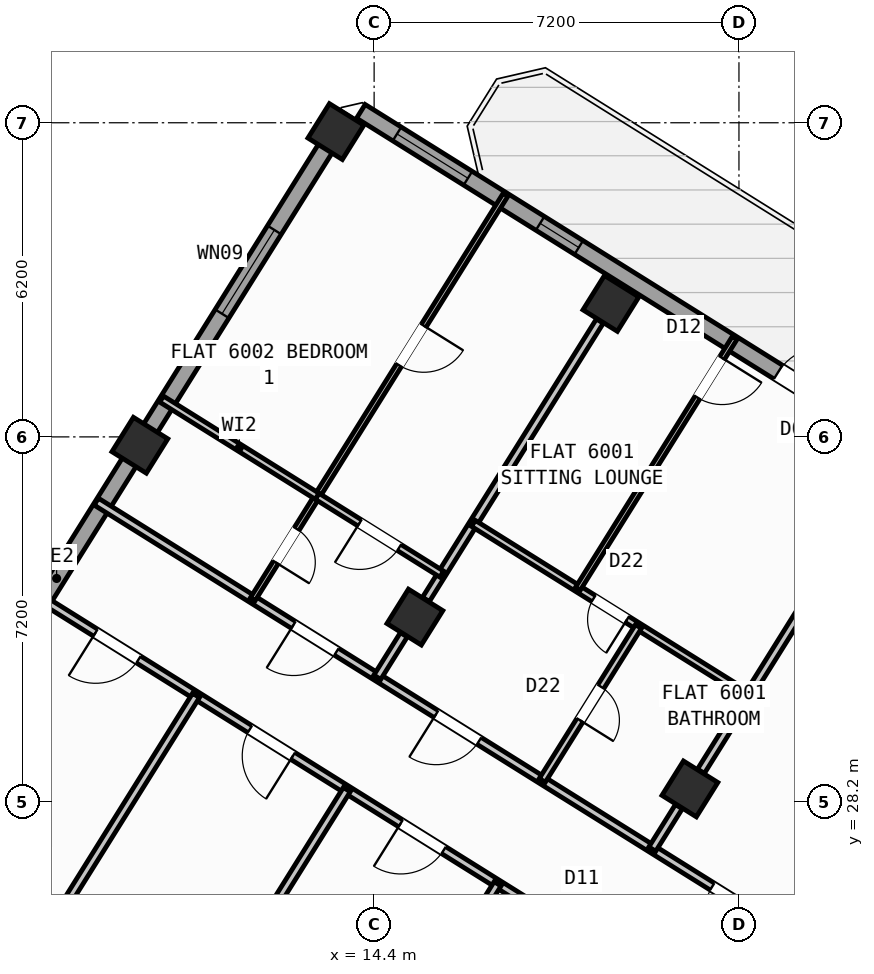
"""IFC4 building model, lengths in metres.
Left out: names, types, materials, properties, quantities, classifications, styles, units other than length and angle.
Written with IfcOpenShell. Run it as: python <this file> out.ifc"""

import sys

from ifc_helpers import new_model, si_unit, direction, frame, frame_2d, origin, origin_2d, place, context, subcontext, project, spatial, rectangle, hollow_rectangle, extrude, source, transform, mapped, element, fill, save


model = new_model("IFC4")
c1 = context("Model", 3, precision=1e-05, world=origin(), true_north=direction((0.0, 1.0)))
c2 = subcontext(c1, "Body", "Model", "MODEL_VIEW")
j1 = project(units=[si_unit("LENGTHUNIT", "METRE"), si_unit("PLANEANGLEUNIT", "RADIAN")], contexts=[c1])
p1 = place(None, origin())
s1 = spatial("IfcSite", under=j1, at=p1, CompositionType="ELEMENT")
p2 = place(p1, origin())
s2 = spatial("IfcBuilding", under=s1, at=p2, CompositionType="ELEMENT")
p3 = place(p2, frame((0.0, 0.0, 238.5)))
s3 = spatial("IfcBuildingStorey", under=s2, at=p3, CompositionType="ELEMENT", Elevation=238.5)
m1 = source(origin(), c2, "Body", "SweptSolid", [
    extrude(hollow_rectangle(XDim=0.8, YDim=0.8, WallThickness=0.032, at=origin_2d()), origin(), (0.0, 0.0, 1.0), 3.6),
])
for number, where, z_axis, x_axis in (
    (1, (20.632, 28.452, 0.0), (0.0, 0.0, 1.0), (-0.848, 0.53, 0.0)),
    (2, (19.073, 38.034, 0.0), (0.0, 0.0, 1.0), (-0.848, 0.53, 0.0)),
    (3, (15.205, 31.844, 0.0), (0.0, 0.0, 1.0), (-0.848, 0.53, 0.0)),
    (4, (13.646, 41.426, 0.0), (0.0, 0.0, 1.0), (-0.848, 0.53, 0.0)),
    (5, (9.777, 35.235, 0.0), (0.0, 0.0, 1.0), (-0.848, 0.53, 0.0)),
):
    element("IfcColumn", number, at=place(p3, frame(where, z_axis=z_axis, x_axis=x_axis)), inside=s3, PredefinedType="COLUMN", context=c2, shape_type="MappedRepresentation", body=[
        mapped(m1, transform((0.0, 0.0, 0.0), scale=1.0)),
    ])
p4 = place(p3, frame((2.415, 23.452, 0.0), z_axis=(0.0, 0.0, 1.0), x_axis=(0.52991049553, 0.848053575387, 0.0)))
e6 = element("IfcWall", 6, at=p4, inside=s3, PredefinedType="STANDARD", context=c2, shape_type="SweptSolid", body=[
    extrude(rectangle(XDim=21.587, YDim=0.32, at=frame_2d((10.794, 0.0))), origin(), (0.0, 0.0, 1.0), 2.875),
])
p5 = place(p4, frame((2.581, 0.0, 0.9)))
e7 = element("IfcOpeningElement", 7, at=p5, cuts=e6, PredefinedType="OPENING", context=c2, shape_type="SweptSolid", body=[
    extrude(rectangle(XDim=1.65, YDim=1.45, at=frame_2d((0.825, 0.725))), frame((0.0, 0.17, 0.0), z_axis=(0.0, -1.0, 0.0), x_axis=(1.0, 0.0, 0.0)), (0.0, 0.0, 1.0), 0.34),
])
p6 = place(p4, frame((7.879, 0.0, 0.9)))
e8 = element("IfcOpeningElement", 8, at=p6, cuts=e6, PredefinedType="OPENING", context=c2, shape_type="SweptSolid", body=[
    extrude(rectangle(XDim=1.35, YDim=1.45, at=frame_2d((0.675, 0.725))), frame((0.0, 0.17, 0.0), z_axis=(0.0, -1.0, 0.0), x_axis=(1.0, 0.0, 0.0)), (0.0, 0.0, 1.0), 0.34),
])
p7 = place(p4, frame((16.954, 0.0, 0.95)))
e9 = element("IfcOpeningElement", 9, at=p7, cuts=e6, PredefinedType="OPENING", context=c2, shape_type="SweptSolid", body=[
    extrude(rectangle(XDim=1.95, YDim=1.35, at=frame_2d((0.975, 0.675))), frame((0.0, 0.17, 0.0), z_axis=(0.0, -1.0, 0.0), x_axis=(1.0, 0.0, 0.0)), (0.0, 0.0, 1.0), 0.34),
])
p8 = place(p3, frame((14.138, 41.825, 0.0), z_axis=(0.0, 0.0, 1.0), x_axis=(0.848046498049, -0.529921821731, 0.0)))
e10 = element("IfcWall", 10, at=p8, inside=s3, PredefinedType="STANDARD", context=c2, shape_type="SweptSolid", body=[
    extrude(rectangle(XDim=31.588, YDim=0.32, at=frame_2d((15.794, 0.0))), origin(), (0.0, 0.0, 1.0), 3.35),
])
p9 = place(p8, frame((9.712, 0.0, 0.0)))
e11 = element("IfcOpeningElement", 11, at=p9, cuts=e10, PredefinedType="OPENING", context=c2, shape_type="SweptSolid", body=[
    extrude(rectangle(XDim=1.05, YDim=2.15, at=frame_2d((0.525, 1.075))), frame((0.0, 0.17, 0.0), z_axis=(0.0, -1.0, 0.0), x_axis=(1.0, 0.0, 0.0)), (0.0, 0.0, 1.0), 0.34),
])
p10 = place(p8, frame((0.841, 0.0, 0.9)))
e12 = element("IfcOpeningElement", 12, at=p10, cuts=e10, PredefinedType="OPENING", context=c2, shape_type="SweptSolid", body=[
    extrude(rectangle(XDim=1.65, YDim=1.45, at=frame_2d((0.825, 0.725))), frame((0.0, 0.17, 0.0), z_axis=(0.0, -1.0, 0.0), x_axis=(1.0, 0.0, 0.0)), (0.0, 0.0, 1.0), 0.34),
])
p11 = place(p8, frame((4.171, 0.0, 1.0)))
e13 = element("IfcOpeningElement", 13, at=p11, cuts=e10, PredefinedType="OPENING", context=c2, shape_type="SweptSolid", body=[
    extrude(rectangle(XDim=0.9, YDim=1.25, at=frame_2d((0.45, 0.625))), frame((0.0, 0.17, 0.0), z_axis=(0.0, -1.0, 0.0), x_axis=(1.0, 0.0, 0.0)), (0.0, 0.0, 1.0), 0.34),
])
p12 = place(p8, frame((13.624, 0.0, 0.95)))
e14 = element("IfcOpeningElement", 14, at=p12, cuts=e10, PredefinedType="OPENING", context=c2, shape_type="SweptSolid", body=[
    extrude(rectangle(XDim=1.95, YDim=1.35, at=frame_2d((0.975, 0.675))), frame((0.0, 0.17, 0.0), z_axis=(0.0, -1.0, 0.0), x_axis=(1.0, 0.0, 0.0)), (0.0, 0.0, 1.0), 0.34),
])
p13 = place(p8, frame((17.129, 0.0, 1.0)))
e15 = element("IfcOpeningElement", 15, at=p13, cuts=e10, PredefinedType="OPENING", context=c2, shape_type="SweptSolid", body=[
    extrude(rectangle(XDim=0.9, YDim=1.25, at=frame_2d((0.45, 0.625))), frame((0.0, 0.17, 0.0), z_axis=(0.0, -1.0, 0.0), x_axis=(1.0, 0.0, 0.0)), (0.0, 0.0, 1.0), 0.34),
])
p14 = place(p8, frame((21.744, 0.0, 0.9)))
e16 = element("IfcOpeningElement", 16, at=p14, cuts=e10, PredefinedType="OPENING", context=c2, shape_type="SweptSolid", body=[
    extrude(rectangle(XDim=1.65, YDim=1.45, at=frame_2d((0.825, 0.725))), frame((0.0, 0.17, 0.0), z_axis=(0.0, -1.0, 0.0), x_axis=(1.0, 0.0, 0.0)), (0.0, 0.0, 1.0), 0.34),
])
p15 = place(p8, frame((27.394, 0.0, 0.9)))
e17 = element("IfcOpeningElement", 17, at=p15, cuts=e10, PredefinedType="OPENING", context=c2, shape_type="SweptSolid", body=[
    extrude(rectangle(XDim=1.65, YDim=1.45, at=frame_2d((0.825, 0.725))), frame((0.0, 0.17, 0.0), z_axis=(0.0, -1.0, 0.0), x_axis=(1.0, 0.0, 0.0)), (0.0, 0.0, 1.0), 0.34),
])
p16 = place(p3, frame((23.104, 25.256, 0.0), z_axis=(0.0, 0.0, 1.0), x_axis=(-0.848041752158, 0.529929416617, 0.0)))
e18 = element("IfcWall", 18, at=p16, inside=s3, PredefinedType="PARTITIONING", context=c2, shape_type="SweptSolid", body=[
    extrude(rectangle(XDim=16.73, YDim=0.16, at=frame_2d((8.365, 0.0))), origin(), (0.0, 0.0, 1.0), 3.34),
])
p17 = place(p16, frame((1.395, 0.0, 0.0)))
e19 = element("IfcOpeningElement", 19, at=p17, cuts=e18, PredefinedType="OPENING", context=c2, shape_type="SweptSolid", body=[
    extrude(rectangle(XDim=1.0, YDim=2.1, at=frame_2d((0.5, 1.05))), frame((0.0, 0.09, 0.0), z_axis=(0.0, -1.0, 0.0), x_axis=(1.0, 0.0, 0.0)), (0.0, 0.0, 1.0), 0.18),
])
p18 = place(p16, frame((7.82, 0.0, 0.0)))
e20 = element("IfcOpeningElement", 20, at=p18, cuts=e18, PredefinedType="OPENING", context=c2, shape_type="SweptSolid", body=[
    extrude(rectangle(XDim=1.0, YDim=2.1, at=frame_2d((0.5, 1.05))), frame((0.0, 0.09, 0.0), z_axis=(0.0, -1.0, 0.0), x_axis=(1.0, 0.0, 0.0)), (0.0, 0.0, 1.0), 0.18),
])
p19 = place(p16, frame((11.14, 0.0, 0.0)))
e21 = element("IfcOpeningElement", 21, at=p19, cuts=e18, PredefinedType="OPENING", context=c2, shape_type="SweptSolid", body=[
    extrude(rectangle(XDim=1.0, YDim=2.1, at=frame_2d((0.5, 1.05))), frame((0.0, 0.09, 0.0), z_axis=(0.0, -1.0, 0.0), x_axis=(1.0, 0.0, 0.0)), (0.0, 0.0, 1.0), 0.18),
])
p20 = place(p3, frame((21.938, 23.391, 0.0), z_axis=(0.0, 0.0, 1.0), x_axis=(-0.848045850158, 0.529922858565, 0.0)))
e22 = element("IfcWall", 22, at=p20, inside=s3, PredefinedType="PARTITIONING", context=c2, shape_type="SweptSolid", body=[
    extrude(rectangle(XDim=16.73, YDim=0.16, at=frame_2d((8.365, 0.0))), origin(), (0.0, 0.0, 1.0), 3.34),
])
p21 = place(p20, frame((0.92, 0.0, 0.0)))
e23 = element("IfcOpeningElement", 23, at=p21, cuts=e22, PredefinedType="OPENING", context=c2, shape_type="SweptSolid", body=[
    extrude(rectangle(XDim=1.0, YDim=2.1, at=frame_2d((0.5, 1.05))), frame((0.0, 0.09, 0.0), z_axis=(0.0, -1.0, 0.0), x_axis=(1.0, 0.0, 0.0)), (0.0, 0.0, 1.0), 0.18),
])
p22 = place(p20, frame((3.928, 0.0, 0.0)))
e24 = element("IfcOpeningElement", 24, at=p22, cuts=e22, PredefinedType="OPENING", context=c2, shape_type="SweptSolid", body=[
    extrude(rectangle(XDim=1.0, YDim=2.1, at=frame_2d((0.5, 1.05))), frame((0.0, 0.09, 0.0), z_axis=(0.0, -1.0, 0.0), x_axis=(1.0, 0.0, 0.0)), (0.0, 0.0, 1.0), 0.18),
])
p23 = place(p20, frame((7.271, 0.0, 0.0)))
e25 = element("IfcOpeningElement", 25, at=p23, cuts=e22, PredefinedType="OPENING", context=c2, shape_type="SweptSolid", body=[
    extrude(rectangle(XDim=1.0, YDim=2.1, at=frame_2d((0.5, 1.05))), frame((0.0, 0.09, 0.0), z_axis=(0.0, -1.0, 0.0), x_axis=(1.0, 0.0, 0.0)), (0.0, 0.0, 1.0), 0.18),
])
p24 = place(p20, frame((10.78, 0.0, 0.0)))
e26 = element("IfcOpeningElement", 26, at=p24, cuts=e22, PredefinedType="OPENING", context=c2, shape_type="SweptSolid", body=[
    extrude(rectangle(XDim=1.0, YDim=2.1, at=frame_2d((0.5, 1.05))), frame((0.0, 0.09, 0.0), z_axis=(0.0, -1.0, 0.0), x_axis=(1.0, 0.0, 0.0)), (0.0, 0.0, 1.0), 0.18),
])
p25 = place(p20, frame((14.372, 0.0, 0.0)))
e27 = element("IfcOpeningElement", 27, at=p25, cuts=e22, PredefinedType="OPENING", context=c2, shape_type="SweptSolid", body=[
    extrude(rectangle(XDim=1.0, YDim=2.1, at=frame_2d((0.5, 1.05))), frame((0.0, 0.09, 0.0), z_axis=(0.0, -1.0, 0.0), x_axis=(1.0, 0.0, 0.0)), (0.0, 0.0, 1.0), 0.18),
])
p26 = place(p3, frame((16.837, 26.579, 0.0), z_axis=(0.0, 0.0, 1.0), x_axis=(-0.529941690036, -0.848034082547, 0.0)))
e28 = element("IfcWall", 28, at=p26, inside=s3, PredefinedType="PARTITIONING", context=c2, shape_type="SweptSolid", body=[
    extrude(rectangle(XDim=10.35, YDim=0.16, at=frame_2d((5.175, 0.0))), origin(), (0.0, 0.0, 1.0), 3.025),
])
p27 = place(p3, frame((13.861, 28.438, 0.0), z_axis=(0.0, 0.0, 1.0), x_axis=(-0.529931089283, -0.848040706931, 0.0)))
e29 = element("IfcWall", 29, at=p27, inside=s3, PredefinedType="PARTITIONING", context=c2, shape_type="SweptSolid", body=[
    extrude(rectangle(XDim=10.35, YDim=0.16, at=frame_2d((5.175, 0.0))), origin(), (0.0, 0.0, 1.0), 3.34),
])
p28 = place(p3, frame((10.885, 30.298, 0.0), z_axis=(0.0, 0.0, 1.0), x_axis=(-0.529924725692, -0.848044683434, 0.0)))
e30 = element("IfcWall", 30, at=p28, inside=s3, PredefinedType="PARTITIONING", context=c2, shape_type="SweptSolid", body=[
    extrude(rectangle(XDim=10.35, YDim=0.16, at=frame_2d((5.175, 0.0))), origin(), (0.0, 0.0, 1.0), 3.34),
])
p29 = place(p3, frame((24.282, 34.293, 0.0), z_axis=(0.0, 0.0, 1.0), x_axis=(-0.529934553702, -0.848038542045, 0.0)))
e31 = element("IfcWall", 31, at=p29, inside=s3, PredefinedType="PARTITIONING", context=c2, shape_type="SweptSolid", body=[
    extrude(rectangle(XDim=6.476, YDim=0.16, at=frame_2d((3.238, 0.0))), origin(), (0.0, 0.0, 1.0), 2.875),
])
p30 = place(p3, frame((20.414, 28.103, 0.0), z_axis=(0.0, 0.0, 1.0), x_axis=(-0.529998940003, -0.847998304005, 0.0)))
e32 = element("IfcWall", 32, at=p30, inside=s3, PredefinedType="PARTITIONING", context=c2, shape_type="SweptSolid", body=[
    extrude(rectangle(XDim=0.988, YDim=0.16, at=frame_2d((0.494, 0.0))), origin(), (0.0, 0.0, 1.0), 2.875),
])
p31 = place(p3, frame((18.854, 37.685, 0.0), z_axis=(0.0, 0.0, 1.0), x_axis=(-0.529907440938, -0.848055484057, 0.0)))
e33 = element("IfcWall", 33, at=p31, inside=s3, PredefinedType="PARTITIONING", context=c2, shape_type="SweptSolid", body=[
    extrude(rectangle(XDim=6.476, YDim=0.16, at=frame_2d((3.238, 0.0))), origin(), (0.0, 0.0, 1.0), 2.875),
])
p32 = place(p3, frame((14.986, 31.494, 0.0), z_axis=(0.0, 0.0, 1.0), x_axis=(-0.529821225456, -0.848109349704, 0.0)))
e34 = element("IfcWall", 34, at=p32, inside=s3, PredefinedType="PARTITIONING", context=c2, shape_type="SweptSolid", body=[
    extrude(rectangle(XDim=0.988, YDim=0.16, at=frame_2d((0.494, 0.0))), origin(), (0.0, 0.0, 1.0), 2.875),
])
p33 = place(p3, frame((21.787, 30.301, 0.0), z_axis=(0.0, 0.0, 1.0), x_axis=(-0.848049732085, 0.529916646191, 0.0)))
e35 = element("IfcWall", 35, at=p33, inside=s3, PredefinedType="PLUMBINGWALL", context=c2, shape_type="SweptSolid", body=[
    extrude(rectangle(XDim=6.4, YDim=0.14, at=frame_2d((3.2, 0.0))), origin(), (0.0, 0.0, 1.0), 3.34),
])
p34 = place(p33, frame((2.824, 0.0, 0.0)))
e36 = element("IfcOpeningElement", 36, at=p34, cuts=e35, PredefinedType="OPENING", context=c2, shape_type="SweptSolid", body=[
    extrude(rectangle(XDim=0.78, YDim=2.05, at=frame_2d((0.39, 1.025))), frame((0.0, 0.08, 0.0), z_axis=(0.0, -1.0, 0.0), x_axis=(1.0, 0.0, 0.0)), (0.0, 0.0, 1.0), 0.16),
])
p35 = place(p3, frame((19.616, 31.657, 0.0), z_axis=(0.0, 0.0, 1.0), x_axis=(-0.529876336437, -0.84807491891, 0.0)))
e37 = element("IfcWall", 37, at=p35, inside=s3, PredefinedType="PLUMBINGWALL", context=c2, shape_type="SweptSolid", body=[
    extrude(rectangle(XDim=3.58, YDim=0.14, at=frame_2d((1.79, 0.0))), origin(), (0.0, 0.0, 1.0), 3.34),
])
p36 = place(p35, frame((1.4, 0.0, 0.0)))
e38 = element("IfcOpeningElement", 38, at=p36, cuts=e37, PredefinedType="OPENING", context=c2, shape_type="SweptSolid", body=[
    extrude(rectangle(XDim=0.78, YDim=2.05, at=frame_2d((0.39, 1.025))), frame((0.0, 0.08, 0.0), z_axis=(0.0, -1.0, 0.0), x_axis=(1.0, 0.0, 0.0)), (0.0, 0.0, 1.0), 0.16),
])
p37 = place(p3, frame((21.517, 37.356, 0.0), z_axis=(0.0, 0.0, 1.0), x_axis=(-0.529916267533, -0.848049968695, 0.0)))
e39 = element("IfcWall", 39, at=p37, inside=s3, PredefinedType="PARTITIONING", context=c2, shape_type="SweptSolid", body=[
    extrude(rectangle(XDim=5.84, YDim=0.11, at=frame_2d((2.92, 0.0))), origin(), (0.0, 0.0, 1.0), 3.34),
])
p38 = place(p37, frame((0.47, 0.0, 0.0)))
e40 = element("IfcOpeningElement", 40, at=p38, cuts=e39, PredefinedType="OPENING", context=c2, shape_type="SweptSolid", body=[
    extrude(rectangle(XDim=0.92, YDim=2.08, at=frame_2d((0.46, 1.04))), frame((0.0, 0.065, 0.0), z_axis=(0.0, -1.0, 0.0), x_axis=(1.0, 0.0, 0.0)), (0.0, 0.0, 1.0), 0.13),
])
p39 = place(p3, frame((16.995, 40.182, 0.0), z_axis=(0.0, 0.0, 1.0), x_axis=(-0.529931378574, -0.848040526156, 0.0)))
e41 = element("IfcWall", 41, at=p39, inside=s3, PredefinedType="PARTITIONING", context=c2, shape_type="SweptSolid", body=[
    extrude(rectangle(XDim=9.42, YDim=0.11, at=frame_2d((4.71, 0.0))), origin(), (0.0, 0.0, 1.0), 3.34),
])
p40 = place(p39, frame((7.78, 0.0, 0.0)))
e42 = element("IfcOpeningElement", 42, at=p40, cuts=e41, PredefinedType="OPENING", context=c2, shape_type="SweptSolid", body=[
    extrude(rectangle(XDim=0.78, YDim=2.05, at=frame_2d((0.39, 1.025))), frame((0.0, 0.065, 0.0), z_axis=(0.0, -1.0, 0.0), x_axis=(1.0, 0.0, 0.0)), (0.0, 0.0, 1.0), 0.13),
])
p41 = place(p39, frame((3.05, 0.0, 0.0)))
e43 = element("IfcOpeningElement", 43, at=p41, cuts=e41, PredefinedType="OPENING", context=c2, shape_type="SweptSolid", body=[
    extrude(rectangle(XDim=0.92, YDim=2.08, at=frame_2d((0.46, 1.04))), frame((0.0, 0.065, 0.0), z_axis=(0.0, -1.0, 0.0), x_axis=(1.0, 0.0, 0.0)), (0.0, 0.0, 1.0), 0.13),
])
p42 = place(p3, frame((15.734, 32.692, 0.0), z_axis=(0.0, 0.0, 1.0), x_axis=(-0.848059786386, 0.529900555496, 0.0)))
e44 = element("IfcWall", 44, at=p42, inside=s3, PredefinedType="PLUMBINGWALL", context=c2, shape_type="SweptSolid", body=[
    extrude(rectangle(XDim=2.9, YDim=0.14, at=frame_2d((1.45, 0.0))), origin(), (0.0, 0.0, 1.0), 3.34),
])
p43 = place(p42, frame((0.99, 0.0, 0.0)))
e45 = element("IfcOpeningElement", 45, at=p43, cuts=e44, PredefinedType="OPENING", context=c2, shape_type="SweptSolid", body=[
    extrude(rectangle(XDim=0.92, YDim=2.08, at=frame_2d((0.46, 1.04))), frame((0.0, 0.08, 0.0), z_axis=(0.0, -1.0, 0.0), x_axis=(1.0, 0.0, 0.0)), (0.0, 0.0, 1.0), 0.16),
])
p44 = place(p3, frame((13.275, 34.228, 0.0), z_axis=(0.0, 0.0, 1.0), x_axis=(-0.848039976902, 0.529932257535, 0.0)))
e46 = element("IfcWall", 46, at=p44, inside=s3, PredefinedType="PLUMBINGWALL", context=c2, shape_type="SweptSolid", body=[
    extrude(rectangle(XDim=3.62, YDim=0.14, at=frame_2d((1.81, 0.0))), origin(), (0.0, 0.0, 1.0), 3.34),
])
m2 = source(origin(), c2, "Body", "SweptSolid", [
    extrude(rectangle(XDim=1.05, YDim=2.15, at=frame_2d((0.525, 1.075))), frame((0.0, 0.025, 0.0), z_axis=(0.0, -1.0, 0.0), x_axis=(1.0, 0.0, 0.0)), (0.0, 0.0, 1.0), 0.05),
])
p45 = place(p9, origin())
e47 = element("IfcDoor", 47, at=p45, inside=s3, OperationType="SINGLE_SWING_RIGHT", PredefinedType="DOOR", context=c2, shape_type="MappedRepresentation", body=[
    mapped(m2, transform((0.0, 0.0, 0.0), scale=1.0)),
])
fill(e11, e47)
m3 = source(origin(), c2, "Body", "SweptSolid", [
    extrude(rectangle(XDim=1.95, YDim=1.35, at=frame_2d((0.975, 0.675))), frame((0.0, 0.03, 0.0), z_axis=(0.0, -1.0, 0.0), x_axis=(1.0, 0.0, 0.0)), (0.0, 0.0, 1.0), 0.06),
])
p46 = place(p7, origin())
e48 = element("IfcWindow", 48, at=p46, inside=s3, PartitioningType="SINGLE_PANEL", PredefinedType="WINDOW", context=c2, shape_type="MappedRepresentation", body=[
    mapped(m3, transform((0.0, 0.0, 0.0), scale=1.0)),
])
fill(e9, e48)
m4 = source(origin(), c2, "Body", "SweptSolid", [
    extrude(rectangle(XDim=1.65, YDim=1.45, at=frame_2d((0.825, 0.725))), frame((0.0, 0.03, 0.0), z_axis=(0.0, -1.0, 0.0), x_axis=(1.0, 0.0, 0.0)), (0.0, 0.0, 1.0), 0.06),
])
p47 = place(p10, origin())
e49 = element("IfcWindow", 49, at=p47, inside=s3, PartitioningType="SINGLE_PANEL", PredefinedType="WINDOW", context=c2, shape_type="MappedRepresentation", body=[
    mapped(m4, transform((0.0, 0.0, 0.0), scale=1.0)),
])
fill(e12, e49)
m5 = source(origin(), c2, "Body", "SweptSolid", [
    extrude(rectangle(XDim=0.9, YDim=1.25, at=frame_2d((0.45, 0.625))), frame((0.0, 0.03, 0.0), z_axis=(0.0, -1.0, 0.0), x_axis=(1.0, 0.0, 0.0)), (0.0, 0.0, 1.0), 0.06),
])
p48 = place(p11, origin())
e50 = element("IfcWindow", 50, at=p48, inside=s3, PartitioningType="SINGLE_PANEL", PredefinedType="WINDOW", context=c2, shape_type="MappedRepresentation", body=[
    mapped(m5, transform((0.0, 0.0, 0.0), scale=1.0)),
])
fill(e13, e50)
m6 = source(origin(), c2, "Body", "SweptSolid", [
    extrude(rectangle(XDim=1.0, YDim=2.1, at=frame_2d((0.5, 1.05))), frame((0.0, 0.025, 0.0), z_axis=(0.0, -1.0, 0.0), x_axis=(1.0, 0.0, 0.0)), (0.0, 0.0, 1.0), 0.05),
])
p49 = place(p23, origin())
e51 = element("IfcDoor", 51, at=p49, inside=s3, OperationType="SINGLE_SWING_RIGHT", PredefinedType="DOOR", context=c2, shape_type="MappedRepresentation", body=[
    mapped(m6, transform((0.0, 0.0, 0.0), scale=1.0)),
])
fill(e25, e51)
p50 = place(p24, origin())
e52 = element("IfcDoor", 52, at=p50, inside=s3, OperationType="SINGLE_SWING_LEFT", PredefinedType="DOOR", context=c2, shape_type="MappedRepresentation", body=[
    mapped(m6, transform((0.0, 0.0, 0.0), scale=1.0)),
])
fill(e26, e52)
p51 = place(p25, origin())
e53 = element("IfcDoor", 53, at=p51, inside=s3, OperationType="SINGLE_SWING_RIGHT", PredefinedType="DOOR", context=c2, shape_type="MappedRepresentation", body=[
    mapped(m6, transform((0.0, 0.0, 0.0), scale=1.0)),
])
fill(e27, e53)
p52 = place(p17, origin())
e54 = element("IfcDoor", 54, at=p52, inside=s3, OperationType="SINGLE_SWING_LEFT", PredefinedType="DOOR", context=c2, shape_type="MappedRepresentation", body=[
    mapped(m6, transform((0.0, 0.0, 0.0), scale=1.0)),
])
fill(e19, e54)
m7 = source(origin(), c2, "Body", "SweptSolid", [
    extrude(rectangle(XDim=0.92, YDim=2.08, at=frame_2d((0.46, 1.04))), frame((0.0, 0.025, 0.0), z_axis=(0.0, -1.0, 0.0), x_axis=(1.0, 0.0, 0.0)), (0.0, 0.0, 1.0), 0.05),
])
p53 = place(p38, origin())
e55 = element("IfcDoor", 55, at=p53, inside=s3, OperationType="SINGLE_SWING_LEFT", PredefinedType="DOOR", context=c2, shape_type="MappedRepresentation", body=[
    mapped(m7, transform((0.0, 0.0, 0.0), scale=1.0)),
])
fill(e40, e55)
p54 = place(p18, origin())
e56 = element("IfcDoor", 56, at=p54, inside=s3, OperationType="SINGLE_SWING_RIGHT", PredefinedType="DOOR", context=c2, shape_type="MappedRepresentation", body=[
    mapped(m6, transform((0.0, 0.0, 0.0), scale=1.0)),
])
fill(e20, e56)
m8 = source(origin(), c2, "Body", "SweptSolid", [
    extrude(rectangle(XDim=0.78, YDim=2.05, at=frame_2d((0.39, 1.025))), frame((0.0, 0.025, 0.0), z_axis=(0.0, -1.0, 0.0), x_axis=(1.0, 0.0, 0.0)), (0.0, 0.0, 1.0), 0.05),
])
p55 = place(p34, origin())
e57 = element("IfcDoor", 57, at=p55, inside=s3, OperationType="SINGLE_SWING_LEFT", PredefinedType="DOOR", context=c2, shape_type="MappedRepresentation", body=[
    mapped(m8, transform((0.0, 0.0, 0.0), scale=1.0)),
])
fill(e36, e57)
p56 = place(p36, origin())
e58 = element("IfcDoor", 58, at=p56, inside=s3, OperationType="SINGLE_SWING_RIGHT", PredefinedType="DOOR", context=c2, shape_type="MappedRepresentation", body=[
    mapped(m8, transform((0.0, 0.0, 0.0), scale=1.0)),
])
fill(e38, e58)
p57 = place(p19, origin())
e59 = element("IfcDoor", 59, at=p57, inside=s3, OperationType="SINGLE_SWING_RIGHT", PredefinedType="DOOR", context=c2, shape_type="MappedRepresentation", body=[
    mapped(m6, transform((0.0, 0.0, 0.0), scale=1.0)),
])
fill(e21, e59)
p58 = place(p43, origin())
e60 = element("IfcDoor", 60, at=p58, inside=s3, OperationType="SINGLE_SWING_RIGHT", PredefinedType="DOOR", context=c2, shape_type="MappedRepresentation", body=[
    mapped(m7, transform((0.0, 0.0, 0.0), scale=1.0)),
])
fill(e45, e60)
p59 = place(p40, origin())
e61 = element("IfcDoor", 61, at=p59, inside=s3, OperationType="SINGLE_SWING_RIGHT", PredefinedType="DOOR", context=c2, shape_type="MappedRepresentation", body=[
    mapped(m8, transform((0.0, 0.0, 0.0), scale=1.0)),
])
fill(e42, e61)
p60 = place(p41, origin())
e62 = element("IfcDoor", 62, at=p60, inside=s3, OperationType="SINGLE_SWING_LEFT", PredefinedType="DOOR", context=c2, shape_type="MappedRepresentation", body=[
    mapped(m7, transform((0.0, 0.0, 0.0), scale=1.0)),
])
fill(e43, e62)
save(model, sys.argv[1])
